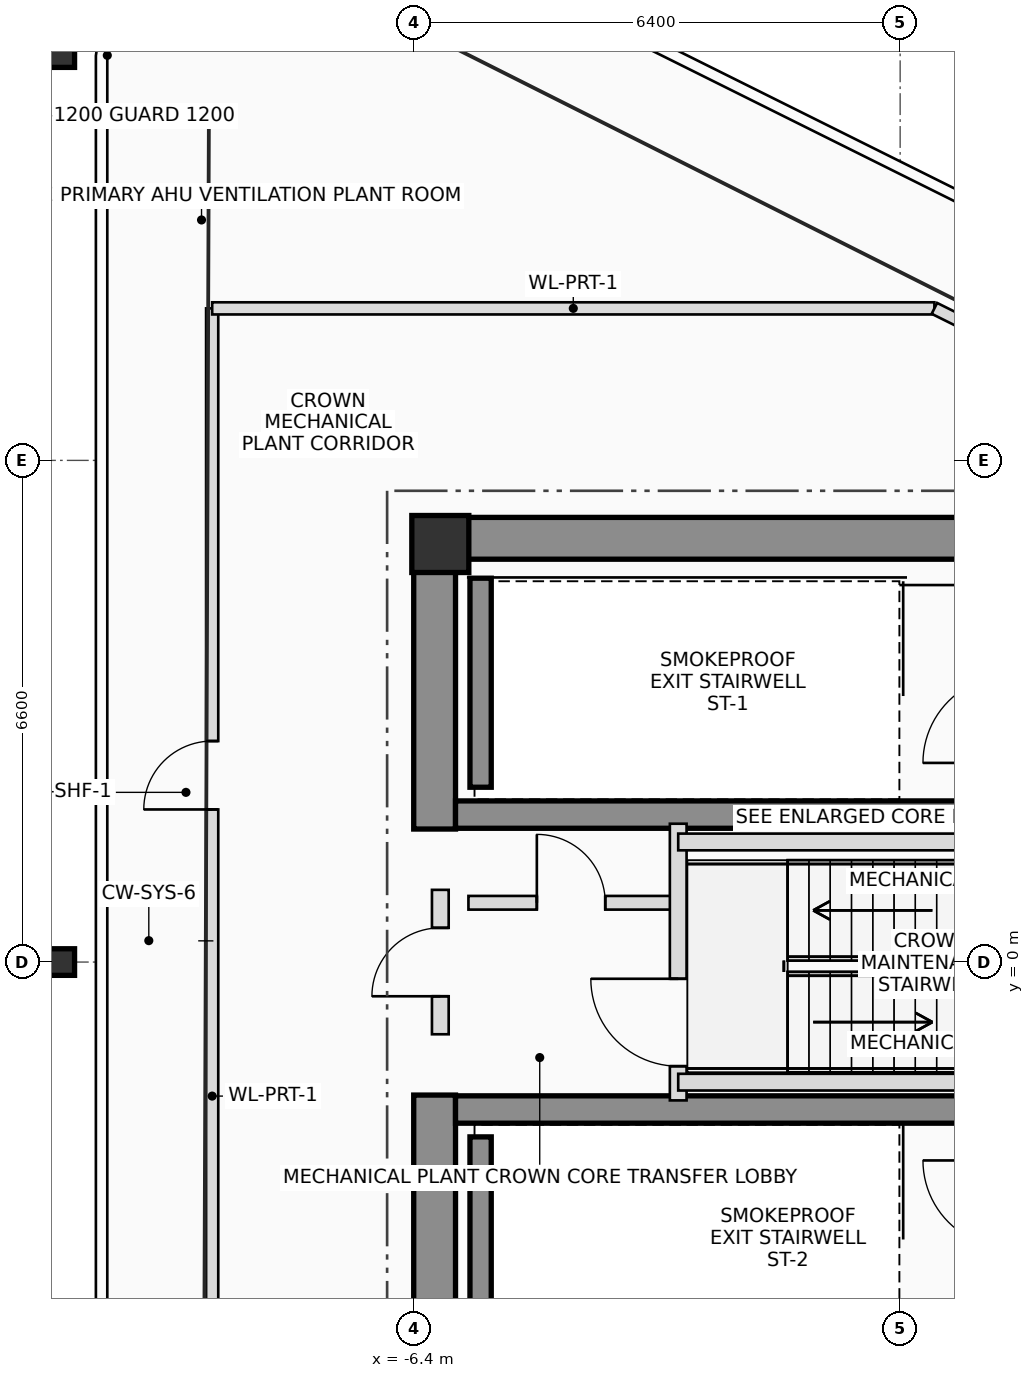
"""IFC4 building model, lengths in metres.
Left out: names, types, materials, properties, quantities, classifications, styles, units other than length and angle.
Written with IfcOpenShell. Run it as: python <this file> out.ifc"""

import sys

from ifc_helpers import new_model, si_unit, direction, frame, frame_2d, origin, origin_2d, place, context, subcontext, project, spatial, rectangle, i_section, extrude, source, transform, mapped, element, fill, save


model = new_model("IFC4")
c1 = context("Model", 3, precision=1e-05, world=origin(), true_north=direction((0.0, 1.0)))
c2 = subcontext(c1, "Body", "Model", "MODEL_VIEW")
j1 = project(units=[si_unit("LENGTHUNIT", "METRE"), si_unit("PLANEANGLEUNIT", "RADIAN")], contexts=[c1])
p1 = place(None, origin())
s1 = spatial("IfcSite", under=j1, at=p1, CompositionType="ELEMENT")
p2 = place(p1, origin())
s2 = spatial("IfcBuilding", under=s1, at=p2, CompositionType="ELEMENT")
p3 = place(p2, frame((0.0, 0.0, 322.85)))
s3 = spatial("IfcBuildingStorey", under=s2, at=p3, CompositionType="ELEMENT", Elevation=322.85)
m1 = source(origin(), c2, "Body", "SweptSolid", [
    extrude(rectangle(XDim=0.75, YDim=0.75, at=origin_2d()), origin(), (0.0, 0.0, 1.0), 5.4),
])
p4 = place(p3, frame((-6.05, 5.5, 0.0), z_axis=(0.0, 0.0, 1.0), x_axis=(1.0, 0.0, 0.0)))
e1 = element("IfcColumn", 1, at=p4, inside=s3, PredefinedType="COLUMN", context=c2, shape_type="MappedRepresentation", body=[
    mapped(m1, transform((0.0, 0.0, 0.0), scale=1.0)),
])
p5 = place(p3, frame((-6.4, 5.575, 0.0), z_axis=(0.0, 0.0, 1.0), x_axis=(1.0, 0.0, 0.0)))
e2 = element("IfcWall", 2, at=p5, inside=s3, PredefinedType="SHEAR", context=c2, shape_type="SweptSolid", body=[
    extrude(rectangle(XDim=12.8, YDim=0.55, at=frame_2d((6.4, 0.0))), origin(), (0.0, 0.0, 1.0), 5.4),
])
p6 = place(p5, frame((8.6, 0.0, 0.0)))
e3 = element("IfcOpeningElement", 3, at=p6, cuts=e2, PredefinedType="OPENING", context=c2, shape_type="SweptSolid", body=[
    extrude(rectangle(XDim=1.2, YDim=2.2, at=frame_2d((0.6, 1.1))), frame((0.0, 0.285, 0.0), z_axis=(0.0, -1.0, 0.0), x_axis=(1.0, 0.0, 0.0)), (0.0, 0.0, 1.0), 0.57),
])
for number, where, z_axis, x_axis in (
    (4, (-6.125, -5.3, 0.0), (0.0, 0.0, 1.0), (0.0, 1.0, 0.0)),
    (5, (-6.125, 1.75, 0.0), (0.0, 0.0, 1.0), (0.0, 1.0, 0.0)),
):
    element("IfcWall", number, at=place(p3, frame(where, z_axis=z_axis, x_axis=x_axis)), inside=s3, PredefinedType="SHEAR", context=c2, shape_type="SweptSolid", body=[
        extrude(rectangle(XDim=3.55, YDim=0.55, at=frame_2d((1.775, 0.0))), origin(), (0.0, 0.0, 1.0), 5.4),
    ])
for number, where, z_axis, x_axis in (
    (6, (-5.85, 1.94, 0.0), (0.0, 0.0, 1.0), (1.0, 0.0, 0.0)),
    (7, (-5.85, -1.94, 0.0), (0.0, 0.0, 1.0), (1.0, 0.0, 0.0)),
):
    element("IfcWall", number, at=place(p3, frame(where, z_axis=z_axis, x_axis=x_axis)), inside=s3, PredefinedType="SHEAR", context=c2, shape_type="SweptSolid", body=[
        extrude(rectangle(XDim=11.7, YDim=0.36, at=frame_2d((5.85, 0.0))), origin(), (0.0, 0.0, 1.0), 5.4),
    ])
for number, where, z_axis, x_axis in (
    (8, (-5.52, 2.3, 0.0), (0.0, 0.0, 1.0), (0.0, 1.0, 0.0)),
    (9, (-5.52, -5.05, 0.0), (0.0, 0.0, 1.0), (0.0, 1.0, 0.0)),
):
    element("IfcWall", number, at=place(p3, frame(where, z_axis=z_axis, x_axis=x_axis)), inside=s3, PredefinedType="SHEAR", context=c2, shape_type="SweptSolid", body=[
        extrude(rectangle(XDim=2.75, YDim=0.28, at=frame_2d((1.375, 0.0))), origin(), (0.0, 0.0, 1.0), 5.4),
    ])
m2 = source(origin(), c2, "Body", "SweptSolid", [
    extrude(i_section(OverallWidth=0.35, OverallDepth=0.35, WebThickness=0.012, FlangeThickness=0.019, FilletRadius=0.016, at=origin_2d()), origin(), (0.0, 0.0, 1.0), 5.4),
])
for number, where, z_axis, x_axis in (
    (10, (-11.037, 11.945, 0.0), (0.0, 0.0, 1.0), (1.0, 0.0, 0.0)),
    (11, (-11.037, 0.0, 0.0), (0.0, 0.0, 1.0), (1.0, 0.0, 0.0)),
):
    element("IfcColumn", number, at=place(p3, frame(where, z_axis=z_axis, x_axis=x_axis)), inside=s3, PredefinedType="COLUMN", context=c2, shape_type="MappedRepresentation", body=[
        mapped(m2, transform((0.0, 0.0, 0.0), scale=1.0)),
    ])
p7 = place(p3, frame((-6.05, -0.95, 0.0), z_axis=(0.0, 0.0, 1.0), x_axis=(0.0, 1.0, 0.0)))
e12 = element("IfcWall", 12, at=p7, inside=s3, PredefinedType="PLUMBINGWALL", context=c2, shape_type="SweptSolid", body=[
    extrude(rectangle(XDim=1.9, YDim=0.22, at=frame_2d((0.95, 0.0))), origin(), (0.0, 0.0, 1.0), 4.1),
])
p8 = place(p7, frame((0.5, 0.0, 0.0)))
e13 = element("IfcOpeningElement", 13, at=p8, cuts=e12, PredefinedType="OPENING", context=c2, shape_type="SweptSolid", body=[
    extrude(rectangle(XDim=0.9, YDim=2.05, at=frame_2d((0.45, 1.025))), frame((0.0, 0.12, 0.0), z_axis=(0.0, -1.0, 0.0), x_axis=(1.0, 0.0, 0.0)), (0.0, 0.0, 1.0), 0.24),
])
p9 = place(p3, frame((-5.68, 0.78, 0.0), z_axis=(0.0, 0.0, 1.0), x_axis=(1.0, 0.0, 0.0)))
e14 = element("IfcWall", 14, at=p9, inside=s3, PredefinedType="PLUMBINGWALL", context=c2, shape_type="SweptSolid", body=[
    extrude(rectangle(XDim=2.76, YDim=0.18, at=frame_2d((1.38, 0.0))), origin(), (0.0, 0.0, 1.0), 5.12),
])
p10 = place(p9, frame((0.9, 0.0, 0.0)))
e15 = element("IfcOpeningElement", 15, at=p10, cuts=e14, PredefinedType="OPENING", context=c2, shape_type="SweptSolid", body=[
    extrude(rectangle(XDim=0.9, YDim=2.05, at=frame_2d((0.45, 1.025))), frame((0.0, 0.1, 0.0), z_axis=(0.0, -1.0, 0.0), x_axis=(1.0, 0.0, 0.0)), (0.0, 0.0, 1.0), 0.2),
])
p11 = place(p3, frame((-2.92, -1.82, 0.0), z_axis=(0.0, 0.0, 1.0), x_axis=(0.0, 1.0, 0.0)))
e16 = element("IfcWall", 16, at=p11, inside=s3, PredefinedType="PLUMBINGWALL", context=c2, shape_type="SweptSolid", body=[
    extrude(rectangle(XDim=3.64, YDim=0.22, at=frame_2d((1.82, 0.0))), origin(), (0.0, 0.0, 1.0), 5.12),
])
p12 = place(p11, frame((0.45, 0.0, 0.0)))
e17 = element("IfcOpeningElement", 17, at=p12, cuts=e16, PredefinedType="OPENING", context=c2, shape_type="SweptSolid", body=[
    extrude(rectangle(XDim=1.15, YDim=2.15, at=frame_2d((0.575, 1.075))), frame((0.0, 0.12, 0.0), z_axis=(0.0, -1.0, 0.0), x_axis=(1.0, 0.0, 0.0)), (0.0, 0.0, 1.0), 0.24),
])
for number, where, z_axis, x_axis in (
    (18, (-2.92, 1.58, 0.0), (0.0, 0.0, 1.0), (1.0, 0.0, 0.0)),
    (19, (-2.92, -1.58, 0.0), (0.0, 0.0, 1.0), (1.0, 0.0, 0.0)),
):
    element("IfcWall", number, at=place(p3, frame(where, z_axis=z_axis, x_axis=x_axis)), inside=s3, PredefinedType="PLUMBINGWALL", context=c2, shape_type="SweptSolid", body=[
        extrude(rectangle(XDim=8.64, YDim=0.22, at=frame_2d((4.32, 0.0))), origin(), (0.0, 0.0, 1.0), 3.59),
    ])
p13 = place(p3, frame((-9.052, -5.385, 0.0), z_axis=(0.0, 0.0, 1.0), x_axis=(0.0, 1.0, 0.0)))
e20 = element("IfcWall", 20, at=p13, inside=s3, PredefinedType="PARTITIONING", context=c2, shape_type="SweptSolid", body=[
    extrude(rectangle(XDim=13.985, YDim=0.16, at=frame_2d((6.992, 0.0))), origin(), (0.0, 0.0, 1.0), 5.12),
])
p14 = place(p13, frame((7.392, 0.0, 0.0)))
e21 = element("IfcOpeningElement", 21, at=p14, cuts=e20, PredefinedType="OPENING", context=c2, shape_type="SweptSolid", body=[
    extrude(rectangle(XDim=0.9, YDim=2.05, at=frame_2d((0.45, 1.025))), frame((0.0, 0.09, 0.0), z_axis=(0.0, -1.0, 0.0), x_axis=(1.0, 0.0, 0.0)), (0.0, 0.0, 1.0), 0.18),
])
p15 = place(p3, frame((-9.052, 8.6, 0.0), z_axis=(0.0, 0.0, 1.0), x_axis=(1.0, 0.0, 0.0)))
e22 = element("IfcWall", 22, at=p15, inside=s3, PredefinedType="PARTITIONING", context=c2, shape_type="SweptSolid", body=[
    extrude(rectangle(XDim=9.502, YDim=0.16, at=frame_2d((4.751, 0.0))), origin(), (0.0, 0.0, 1.0), 5.12),
])
p16 = place(p3, frame((0.451, 8.6, 0.0), z_axis=(0.0, 0.0, 1.0), x_axis=(0.895225733131, -0.445612933766, 0.0)))
e23 = element("IfcWall", 23, at=p16, inside=s3, PredefinedType="PARTITIONING", context=c2, shape_type="SweptSolid", body=[
    extrude(rectangle(XDim=5.249, YDim=0.16, at=frame_2d((2.625, 0.0))), origin(), (0.0, 0.0, 1.0), 5.12),
])
p17 = place(p16, frame((2.545, 0.0, 0.0)))
e24 = element("IfcOpeningElement", 24, at=p17, cuts=e23, PredefinedType="OPENING", context=c2, shape_type="SweptSolid", body=[
    extrude(rectangle(XDim=0.9, YDim=2.05, at=frame_2d((0.45, 1.025))), frame((0.0, 0.09, 0.0), z_axis=(0.0, -1.0, 0.0), x_axis=(1.0, 0.0, 0.0)), (0.0, 0.0, 1.0), 0.18),
])
p18 = place(p8, origin())
e25 = element("IfcDoor", 25, at=p18, inside=s3, OperationType="SINGLE_SWING_LEFT", PredefinedType="DOOR", context=c2, shape_type="SweptSolid", body=[
    extrude(rectangle(XDim=0.9, YDim=2.05, at=frame_2d((0.45, 1.025))), frame((0.0, 0.025, 0.0), z_axis=(0.0, -1.0, 0.0), x_axis=(1.0, 0.0, 0.0)), (0.0, 0.0, 1.0), 0.05),
])
fill(e13, e25)
p19 = place(p10, origin())
e26 = element("IfcDoor", 26, at=p19, inside=s3, OperationType="SINGLE_SWING_LEFT", PredefinedType="DOOR", context=c2, shape_type="SweptSolid", body=[
    extrude(rectangle(XDim=0.9, YDim=2.05, at=frame_2d((0.45, 1.025))), frame((0.0, 0.025, 0.0), z_axis=(0.0, -1.0, 0.0), x_axis=(1.0, 0.0, 0.0)), (0.0, 0.0, 1.0), 0.05),
])
fill(e15, e26)
p20 = place(p12, origin())
e27 = element("IfcDoor", 27, at=p20, inside=s3, OperationType="SINGLE_SWING_RIGHT", PredefinedType="DOOR", context=c2, shape_type="SweptSolid", body=[
    extrude(rectangle(XDim=1.15, YDim=2.15, at=frame_2d((0.575, 1.075))), frame((0.0, 0.025, 0.0), z_axis=(0.0, -1.0, 0.0), x_axis=(1.0, 0.0, 0.0)), (0.0, 0.0, 1.0), 0.05),
])
fill(e17, e27)
p21 = place(p14, origin())
e28 = element("IfcDoor", 28, at=p21, inside=s3, OperationType="SINGLE_SWING_LEFT", PredefinedType="DOOR", context=c2, shape_type="SweptSolid", body=[
    extrude(rectangle(XDim=0.9, YDim=2.05, at=frame_2d((0.45, 1.025))), frame((0.0, 0.025, 0.0), z_axis=(0.0, -1.0, 0.0), x_axis=(1.0, 0.0, 0.0)), (0.0, 0.0, 1.0), 0.05),
])
fill(e21, e28)
save(model, sys.argv[1])
